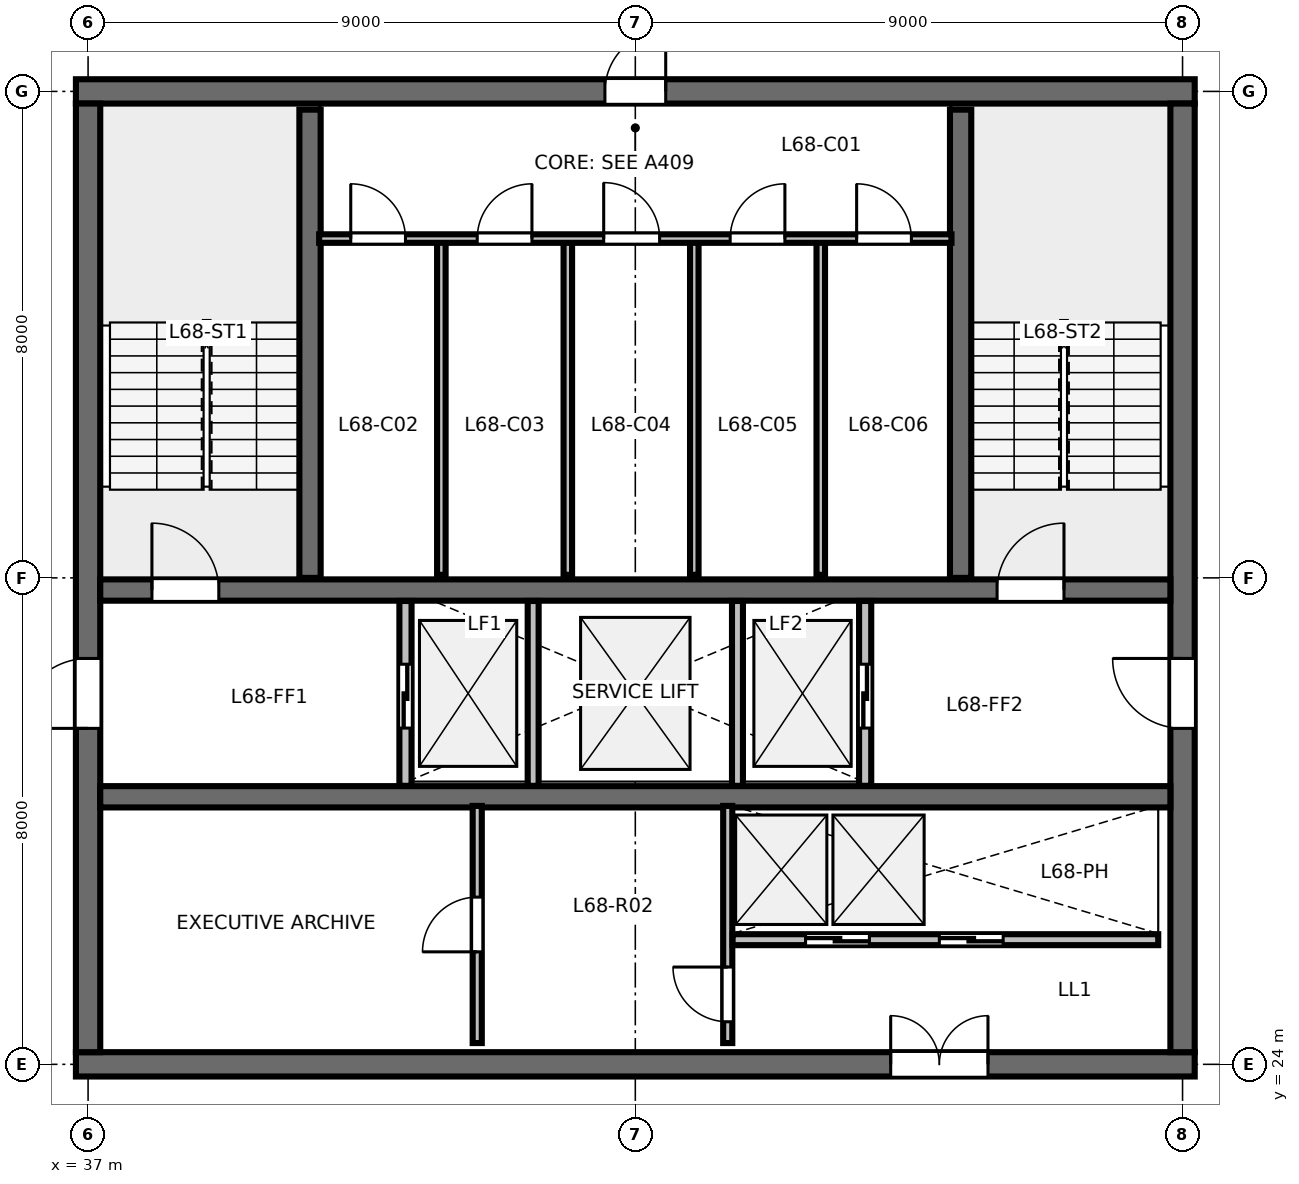
"""IFC4 building model, lengths in metres.
Left out: names, types, materials, properties, quantities, classifications, styles, units other than length and angle.
Written with IfcOpenShell. Run it as: python <this file> out.ifc"""

import sys

from ifc_helpers import new_model, si_unit, direction, frame, frame_2d, origin, place, context, subcontext, project, spatial, rectangle, extrude, element, fill, save


model = new_model("IFC4")
c1 = context("Model", 3, precision=1e-05, world=origin(), true_north=direction((0.0, 1.0)))
c2 = subcontext(c1, "Body", "Model", "MODEL_VIEW")
j1 = project(units=[si_unit("LENGTHUNIT", "METRE"), si_unit("PLANEANGLEUNIT", "RADIAN")], contexts=[c1])
p1 = place(None, origin())
s1 = spatial("IfcSite", under=j1, at=p1, CompositionType="ELEMENT")
p2 = place(p1, origin())
s2 = spatial("IfcBuilding", under=s1, at=p2, CompositionType="ELEMENT")
p3 = place(p2, frame((0.0, 0.0, 257.4)))
s3 = spatial("IfcBuildingStorey", under=s2, at=p3, CompositionType="ELEMENT", Elevation=257.4)
p4 = place(p3, frame((36.8, 24.0, 0.0), z_axis=(0.0, 0.0, 1.0), x_axis=(1.0, 0.0, 0.0)))
e1 = element("IfcWall", 1, at=p4, inside=s3, PredefinedType="SHEAR", context=c2, shape_type="SweptSolid", body=[
    extrude(rectangle(XDim=18.4, YDim=0.4, at=frame_2d((9.2, 0.0))), origin(), (0.0, 0.0, 1.0), 3.36),
])
p5 = place(p4, frame((13.4, 0.0, 0.0)))
e2 = element("IfcOpeningElement", 2, at=p5, cuts=e1, PredefinedType="OPENING", context=c2, shape_type="SweptSolid", body=[
    extrude(rectangle(XDim=1.6, YDim=2.15, at=frame_2d((0.8, 1.075))), frame((0.0, 0.21, 0.0), z_axis=(0.0, -1.0, 0.0), x_axis=(1.0, 0.0, 0.0)), (0.0, 0.0, 1.0), 0.42),
])
p6 = place(p3, frame((36.8, 40.0, 0.0), z_axis=(0.0, 0.0, 1.0), x_axis=(1.0, 0.0, 0.0)))
e3 = element("IfcWall", 3, at=p6, inside=s3, PredefinedType="SHEAR", context=c2, shape_type="SweptSolid", body=[
    extrude(rectangle(XDim=18.4, YDim=0.4, at=frame_2d((9.2, 0.0))), origin(), (0.0, 0.0, 1.0), 3.36),
])
p7 = place(p6, frame((8.7, 0.0, 0.0)))
e4 = element("IfcOpeningElement", 4, at=p7, cuts=e3, PredefinedType="OPENING", context=c2, shape_type="SweptSolid", body=[
    extrude(rectangle(XDim=1.0, YDim=2.15, at=frame_2d((0.5, 1.075))), frame((0.0, 0.21, 0.0), z_axis=(0.0, -1.0, 0.0), x_axis=(1.0, 0.0, 0.0)), (0.0, 0.0, 1.0), 0.42),
])
p8 = place(p3, frame((37.0, 24.2, 0.0), z_axis=(0.0, 0.0, 1.0), x_axis=(0.0, 1.0, 0.0)))
e5 = element("IfcWall", 5, at=p8, inside=s3, PredefinedType="SHEAR", context=c2, shape_type="SweptSolid", body=[
    extrude(rectangle(XDim=15.6, YDim=0.4, at=frame_2d((7.8, 0.0))), origin(), (0.0, 0.0, 1.0), 3.36),
])
p9 = place(p8, frame((5.325, 0.0, 0.0)))
e6 = element("IfcOpeningElement", 6, at=p9, cuts=e5, PredefinedType="OPENING", context=c2, shape_type="SweptSolid", body=[
    extrude(rectangle(XDim=1.15, YDim=2.15, at=frame_2d((0.575, 1.075))), frame((0.0, 0.21, 0.0), z_axis=(0.0, -1.0, 0.0), x_axis=(1.0, 0.0, 0.0)), (0.0, 0.0, 1.0), 0.42),
])
p10 = place(p3, frame((55.0, 24.2, 0.0), z_axis=(0.0, 0.0, 1.0), x_axis=(0.0, 1.0, 0.0)))
e7 = element("IfcWall", 7, at=p10, inside=s3, PredefinedType="SHEAR", context=c2, shape_type="SweptSolid", body=[
    extrude(rectangle(XDim=15.6, YDim=0.4, at=frame_2d((7.8, 0.0))), origin(), (0.0, 0.0, 1.0), 3.36),
])
p11 = place(p10, frame((5.325, 0.0, 0.0)))
e8 = element("IfcOpeningElement", 8, at=p11, cuts=e7, PredefinedType="OPENING", context=c2, shape_type="SweptSolid", body=[
    extrude(rectangle(XDim=1.15, YDim=2.15, at=frame_2d((0.575, 1.075))), frame((0.0, 0.21, 0.0), z_axis=(0.0, -1.0, 0.0), x_axis=(1.0, 0.0, 0.0)), (0.0, 0.0, 1.0), 0.42),
])
p12 = place(p3, frame((37.2, 31.8, 0.0), z_axis=(0.0, 0.0, 1.0), x_axis=(1.0, 0.0, 0.0)))
e9 = element("IfcWall", 9, at=p12, inside=s3, PredefinedType="SHEAR", context=c2, shape_type="SweptSolid", body=[
    extrude(rectangle(XDim=17.6, YDim=0.35, at=frame_2d((8.8, 0.0))), origin(), (0.0, 0.0, 1.0), 3.36),
])
p13 = place(p12, frame((0.85, 0.0, 0.0)))
e10 = element("IfcOpeningElement", 10, at=p13, cuts=e9, PredefinedType="OPENING", context=c2, shape_type="SweptSolid", body=[
    extrude(rectangle(XDim=1.1, YDim=2.15, at=frame_2d((0.55, 1.075))), frame((0.0, 0.185, 0.0), z_axis=(0.0, -1.0, 0.0), x_axis=(1.0, 0.0, 0.0)), (0.0, 0.0, 1.0), 0.37),
])
p14 = place(p12, frame((14.75, 0.0, 0.0)))
e11 = element("IfcOpeningElement", 11, at=p14, cuts=e9, PredefinedType="OPENING", context=c2, shape_type="SweptSolid", body=[
    extrude(rectangle(XDim=1.1, YDim=2.15, at=frame_2d((0.55, 1.075))), frame((0.0, 0.185, 0.0), z_axis=(0.0, -1.0, 0.0), x_axis=(1.0, 0.0, 0.0)), (0.0, 0.0, 1.0), 0.37),
])
p15 = place(p3, frame((37.2, 28.4, 0.0), z_axis=(0.0, 0.0, 1.0), x_axis=(1.0, 0.0, 0.0)))
e12 = element("IfcWall", 12, at=p15, inside=s3, PredefinedType="SHEAR", context=c2, shape_type="SweptSolid", body=[
    extrude(rectangle(XDim=17.6, YDim=0.35, at=frame_2d((8.8, 0.0))), origin(), (0.0, 0.0, 1.0), 3.36),
])
for number, where, z_axis, x_axis in (
    (13, (40.65, 32.0, 0.0), (0.0, 0.0, 1.0), (0.0, 1.0, 0.0)),
    (14, (51.35, 32.0, 0.0), (0.0, 0.0, 1.0), (0.0, 1.0, 0.0)),
):
    element("IfcWall", number, at=place(p3, frame(where, z_axis=z_axis, x_axis=x_axis)), inside=s3, PredefinedType="SHEAR", context=c2, shape_type="SweptSolid", body=[
        extrude(rectangle(XDim=7.7, YDim=0.35, at=frame_2d((3.85, 0.0))), origin(), (0.0, 0.0, 1.0), 3.6),
    ])
for number, where, z_axis, x_axis in (
    (15, (42.81, 32.05, 0.0), (0.0, 0.0, 1.0), (0.0, 1.0, 0.0)),
    (16, (44.89, 32.05, 0.0), (0.0, 0.0, 1.0), (0.0, 1.0, 0.0)),
    (17, (46.97, 32.05, 0.0), (0.0, 0.0, 1.0), (0.0, 1.0, 0.0)),
    (18, (49.05, 32.05, 0.0), (0.0, 0.0, 1.0), (0.0, 1.0, 0.0)),
):
    element("IfcWall", number, at=place(p3, frame(where, z_axis=z_axis, x_axis=x_axis)), inside=s3, PredefinedType="PARTITIONING", context=c2, shape_type="SweptSolid", body=[
        extrude(rectangle(XDim=5.5, YDim=0.14, at=frame_2d((2.75, 0.0))), origin(), (0.0, 0.0, 1.0), 3.375),
    ])
p16 = place(p3, frame((40.8, 37.58, 0.0), z_axis=(0.0, 0.0, 1.0), x_axis=(1.0, 0.0, 0.0)))
e19 = element("IfcWall", 19, at=p16, inside=s3, PredefinedType="PARTITIONING", context=c2, shape_type="SweptSolid", body=[
    extrude(rectangle(XDim=10.4, YDim=0.14, at=frame_2d((5.2, 0.0))), origin(), (0.0, 0.0, 1.0), 3.375),
])
p17 = place(p16, frame((0.52, 0.0, 0.0)))
e20 = element("IfcOpeningElement", 20, at=p17, cuts=e19, PredefinedType="OPENING", context=c2, shape_type="SweptSolid", body=[
    extrude(rectangle(XDim=0.9, YDim=2.15, at=frame_2d((0.45, 1.075))), frame((0.0, 0.08, 0.0), z_axis=(0.0, -1.0, 0.0), x_axis=(1.0, 0.0, 0.0)), (0.0, 0.0, 1.0), 0.16),
])
p18 = place(p16, frame((2.6, 0.0, 0.0)))
e21 = element("IfcOpeningElement", 21, at=p18, cuts=e19, PredefinedType="OPENING", context=c2, shape_type="SweptSolid", body=[
    extrude(rectangle(XDim=0.9, YDim=2.15, at=frame_2d((0.45, 1.075))), frame((0.0, 0.08, 0.0), z_axis=(0.0, -1.0, 0.0), x_axis=(1.0, 0.0, 0.0)), (0.0, 0.0, 1.0), 0.16),
])
p19 = place(p16, frame((4.68, 0.0, 0.0)))
e22 = element("IfcOpeningElement", 22, at=p19, cuts=e19, PredefinedType="OPENING", context=c2, shape_type="SweptSolid", body=[
    extrude(rectangle(XDim=0.92, YDim=2.15, at=frame_2d((0.46, 1.075))), frame((0.0, 0.08, 0.0), z_axis=(0.0, -1.0, 0.0), x_axis=(1.0, 0.0, 0.0)), (0.0, 0.0, 1.0), 0.16),
])
p20 = place(p16, frame((6.76, 0.0, 0.0)))
e23 = element("IfcOpeningElement", 23, at=p20, cuts=e19, PredefinedType="OPENING", context=c2, shape_type="SweptSolid", body=[
    extrude(rectangle(XDim=0.9, YDim=2.15, at=frame_2d((0.45, 1.075))), frame((0.0, 0.08, 0.0), z_axis=(0.0, -1.0, 0.0), x_axis=(1.0, 0.0, 0.0)), (0.0, 0.0, 1.0), 0.16),
])
p21 = place(p16, frame((8.84, 0.0, 0.0)))
e24 = element("IfcOpeningElement", 24, at=p21, cuts=e19, PredefinedType="OPENING", context=c2, shape_type="SweptSolid", body=[
    extrude(rectangle(XDim=0.9, YDim=2.15, at=frame_2d((0.45, 1.075))), frame((0.0, 0.08, 0.0), z_axis=(0.0, -1.0, 0.0), x_axis=(1.0, 0.0, 0.0)), (0.0, 0.0, 1.0), 0.16),
])
p22 = place(p3, frame((42.22, 28.58, 0.0), z_axis=(0.0, 0.0, 1.0), x_axis=(0.0, 1.0, 0.0)))
e25 = element("IfcWall", 25, at=p22, inside=s3, PredefinedType="PARTITIONING", context=c2, shape_type="SweptSolid", body=[
    extrude(rectangle(XDim=3.04, YDim=0.2, at=frame_2d((1.52, 0.0))), origin(), (0.0, 0.0, 1.0), 3.375),
])
p23 = place(p22, frame((0.95, 0.0, 0.0)))
e26 = element("IfcOpeningElement", 26, at=p23, cuts=e25, PredefinedType="OPENING", context=c2, shape_type="SweptSolid", body=[
    extrude(rectangle(XDim=1.05, YDim=2.15, at=frame_2d((0.525, 1.075))), frame((0.0, 0.11, 0.0), z_axis=(0.0, -1.0, 0.0), x_axis=(1.0, 0.0, 0.0)), (0.0, 0.0, 1.0), 0.22),
])
p24 = place(p3, frame((49.78, 28.58, 0.0), z_axis=(0.0, 0.0, 1.0), x_axis=(0.0, 1.0, 0.0)))
e27 = element("IfcWall", 27, at=p24, inside=s3, PredefinedType="PARTITIONING", context=c2, shape_type="SweptSolid", body=[
    extrude(rectangle(XDim=3.04, YDim=0.2, at=frame_2d((1.52, 0.0))), origin(), (0.0, 0.0, 1.0), 3.375),
])
p25 = place(p24, frame((0.95, 0.0, 0.0)))
e28 = element("IfcOpeningElement", 28, at=p25, cuts=e27, PredefinedType="OPENING", context=c2, shape_type="SweptSolid", body=[
    extrude(rectangle(XDim=1.05, YDim=2.15, at=frame_2d((0.525, 1.075))), frame((0.0, 0.11, 0.0), z_axis=(0.0, -1.0, 0.0), x_axis=(1.0, 0.0, 0.0)), (0.0, 0.0, 1.0), 0.22),
])
for number, where, z_axis, x_axis in (
    (29, (44.32, 28.58, 0.0), (0.0, 0.0, 1.0), (0.0, 1.0, 0.0)),
    (30, (47.68, 28.58, 0.0), (0.0, 0.0, 1.0), (0.0, 1.0, 0.0)),
):
    element("IfcWall", number, at=place(p3, frame(where, z_axis=z_axis, x_axis=x_axis)), inside=s3, PredefinedType="PARTITIONING", context=c2, shape_type="SweptSolid", body=[
        extrude(rectangle(XDim=3.04, YDim=0.18, at=frame_2d((1.52, 0.0))), origin(), (0.0, 0.0, 1.0), 3.375),
    ])
p26 = place(p3, frame((43.4, 24.35, 0.0), z_axis=(0.0, 0.0, 1.0), x_axis=(0.0, 1.0, 0.0)))
e31 = element("IfcWall", 31, at=p26, inside=s3, PredefinedType="PARTITIONING", context=c2, shape_type="SweptSolid", body=[
    extrude(rectangle(XDim=3.9, YDim=0.15, at=frame_2d((1.95, 0.0))), origin(), (0.0, 0.0, 1.0), 3.375),
])
p27 = place(p26, frame((1.5, 0.0, 0.0)))
e32 = element("IfcOpeningElement", 32, at=p27, cuts=e31, PredefinedType="OPENING", context=c2, shape_type="SweptSolid", body=[
    extrude(rectangle(XDim=0.9, YDim=2.15, at=frame_2d((0.45, 1.075))), frame((0.0, 0.085, 0.0), z_axis=(0.0, -1.0, 0.0), x_axis=(1.0, 0.0, 0.0)), (0.0, 0.0, 1.0), 0.17),
])
p28 = place(p3, frame((47.52, 24.35, 0.0), z_axis=(0.0, 0.0, 1.0), x_axis=(0.0, 1.0, 0.0)))
e33 = element("IfcWall", 33, at=p28, inside=s3, PredefinedType="PARTITIONING", context=c2, shape_type="SweptSolid", body=[
    extrude(rectangle(XDim=3.9, YDim=0.15, at=frame_2d((1.95, 0.0))), origin(), (0.0, 0.0, 1.0), 3.375),
])
p29 = place(p28, frame((0.35, 0.0, 0.0)))
e34 = element("IfcOpeningElement", 34, at=p29, cuts=e33, PredefinedType="OPENING", context=c2, shape_type="SweptSolid", body=[
    extrude(rectangle(XDim=0.9, YDim=2.15, at=frame_2d((0.45, 1.075))), frame((0.0, 0.085, 0.0), z_axis=(0.0, -1.0, 0.0), x_axis=(1.0, 0.0, 0.0)), (0.0, 0.0, 1.0), 0.17),
])
p30 = place(p3, frame((47.6, 26.05, 0.0), z_axis=(0.0, 0.0, 1.0), x_axis=(1.0, 0.0, 0.0)))
e35 = element("IfcWall", 35, at=p30, inside=s3, PredefinedType="PARTITIONING", context=c2, shape_type="SweptSolid", body=[
    extrude(rectangle(XDim=7.0, YDim=0.18, at=frame_2d((3.5, 0.0))), origin(), (0.0, 0.0, 1.0), 3.375),
])
p31 = place(p30, frame((1.2, 0.0, 0.0)))
e36 = element("IfcOpeningElement", 36, at=p31, cuts=e35, PredefinedType="OPENING", context=c2, shape_type="SweptSolid", body=[
    extrude(rectangle(XDim=1.05, YDim=2.15, at=frame_2d((0.525, 1.075))), frame((0.0, 0.1, 0.0), z_axis=(0.0, -1.0, 0.0), x_axis=(1.0, 0.0, 0.0)), (0.0, 0.0, 1.0), 0.2),
])
p32 = place(p30, frame((3.4, 0.0, 0.0)))
e37 = element("IfcOpeningElement", 37, at=p32, cuts=e35, PredefinedType="OPENING", context=c2, shape_type="SweptSolid", body=[
    extrude(rectangle(XDim=1.05, YDim=2.15, at=frame_2d((0.525, 1.075))), frame((0.0, 0.1, 0.0), z_axis=(0.0, -1.0, 0.0), x_axis=(1.0, 0.0, 0.0)), (0.0, 0.0, 1.0), 0.2),
])
p33 = place(p13, origin())
e38 = element("IfcDoor", 38, at=p33, inside=s3, OperationType="SINGLE_SWING_LEFT", PredefinedType="DOOR", context=c2, shape_type="SweptSolid", body=[
    extrude(rectangle(XDim=1.1, YDim=2.15, at=frame_2d((0.55, 1.075))), frame((0.0, 0.025, 0.0), z_axis=(0.0, -1.0, 0.0), x_axis=(1.0, 0.0, 0.0)), (0.0, 0.0, 1.0), 0.05),
])
fill(e10, e38)
p34 = place(p14, origin())
e39 = element("IfcDoor", 39, at=p34, inside=s3, OperationType="SINGLE_SWING_RIGHT", PredefinedType="DOOR", context=c2, shape_type="SweptSolid", body=[
    extrude(rectangle(XDim=1.1, YDim=2.15, at=frame_2d((0.55, 1.075))), frame((0.0, 0.025, 0.0), z_axis=(0.0, -1.0, 0.0), x_axis=(1.0, 0.0, 0.0)), (0.0, 0.0, 1.0), 0.05),
])
fill(e11, e39)
p35 = place(p7, origin())
e40 = element("IfcDoor", 40, at=p35, inside=s3, OperationType="SINGLE_SWING_RIGHT", PredefinedType="DOOR", context=c2, shape_type="SweptSolid", body=[
    extrude(rectangle(XDim=1.0, YDim=2.15, at=frame_2d((0.5, 1.075))), frame((0.0, 0.025, 0.0), z_axis=(0.0, -1.0, 0.0), x_axis=(1.0, 0.0, 0.0)), (0.0, 0.0, 1.0), 0.05),
])
fill(e4, e40)
p36 = place(p9, origin())
e41 = element("IfcDoor", 41, at=p36, inside=s3, OperationType="SINGLE_SWING_LEFT", PredefinedType="DOOR", context=c2, shape_type="SweptSolid", body=[
    extrude(rectangle(XDim=1.15, YDim=2.15, at=frame_2d((0.575, 1.075))), frame((0.0, 0.025, 0.0), z_axis=(0.0, -1.0, 0.0), x_axis=(1.0, 0.0, 0.0)), (0.0, 0.0, 1.0), 0.05),
])
fill(e6, e41)
p37 = place(p11, origin())
e42 = element("IfcDoor", 42, at=p37, inside=s3, OperationType="SINGLE_SWING_RIGHT", PredefinedType="DOOR", context=c2, shape_type="SweptSolid", body=[
    extrude(rectangle(XDim=1.15, YDim=2.15, at=frame_2d((0.575, 1.075))), frame((0.0, 0.025, 0.0), z_axis=(0.0, -1.0, 0.0), x_axis=(1.0, 0.0, 0.0)), (0.0, 0.0, 1.0), 0.05),
])
fill(e8, e42)
p38 = place(p5, origin())
e43 = element("IfcDoor", 43, at=p38, inside=s3, OperationType="DOUBLE_DOOR_SINGLE_SWING", PredefinedType="DOOR", context=c2, shape_type="SweptSolid", body=[
    extrude(rectangle(XDim=1.6, YDim=2.15, at=frame_2d((0.8, 1.075))), frame((0.0, 0.025, 0.0), z_axis=(0.0, -1.0, 0.0), x_axis=(1.0, 0.0, 0.0)), (0.0, 0.0, 1.0), 0.05),
])
fill(e2, e43)
p39 = place(p17, origin())
e44 = element("IfcDoor", 44, at=p39, inside=s3, OperationType="SINGLE_SWING_LEFT", PredefinedType="DOOR", context=c2, shape_type="SweptSolid", body=[
    extrude(rectangle(XDim=0.9, YDim=2.15, at=frame_2d((0.45, 1.075))), frame((0.0, 0.025, 0.0), z_axis=(0.0, -1.0, 0.0), x_axis=(1.0, 0.0, 0.0)), (0.0, 0.0, 1.0), 0.05),
])
fill(e20, e44)
p40 = place(p18, origin())
e45 = element("IfcDoor", 45, at=p40, inside=s3, OperationType="SINGLE_SWING_RIGHT", PredefinedType="DOOR", context=c2, shape_type="SweptSolid", body=[
    extrude(rectangle(XDim=0.9, YDim=2.15, at=frame_2d((0.45, 1.075))), frame((0.0, 0.025, 0.0), z_axis=(0.0, -1.0, 0.0), x_axis=(1.0, 0.0, 0.0)), (0.0, 0.0, 1.0), 0.05),
])
fill(e21, e45)
p41 = place(p19, origin())
e46 = element("IfcDoor", 46, at=p41, inside=s3, OperationType="SINGLE_SWING_LEFT", PredefinedType="DOOR", context=c2, shape_type="SweptSolid", body=[
    extrude(rectangle(XDim=0.92, YDim=2.15, at=frame_2d((0.46, 1.075))), frame((0.0, 0.025, 0.0), z_axis=(0.0, -1.0, 0.0), x_axis=(1.0, 0.0, 0.0)), (0.0, 0.0, 1.0), 0.05),
])
fill(e22, e46)
p42 = place(p20, origin())
e47 = element("IfcDoor", 47, at=p42, inside=s3, OperationType="SINGLE_SWING_RIGHT", PredefinedType="DOOR", context=c2, shape_type="SweptSolid", body=[
    extrude(rectangle(XDim=0.9, YDim=2.15, at=frame_2d((0.45, 1.075))), frame((0.0, 0.025, 0.0), z_axis=(0.0, -1.0, 0.0), x_axis=(1.0, 0.0, 0.0)), (0.0, 0.0, 1.0), 0.05),
])
fill(e23, e47)
p43 = place(p21, origin())
e48 = element("IfcDoor", 48, at=p43, inside=s3, OperationType="SINGLE_SWING_LEFT", PredefinedType="DOOR", context=c2, shape_type="SweptSolid", body=[
    extrude(rectangle(XDim=0.9, YDim=2.15, at=frame_2d((0.45, 1.075))), frame((0.0, 0.025, 0.0), z_axis=(0.0, -1.0, 0.0), x_axis=(1.0, 0.0, 0.0)), (0.0, 0.0, 1.0), 0.05),
])
fill(e24, e48)
p44 = place(p23, origin())
e49 = element("IfcDoor", 49, at=p44, inside=s3, OperationType="SLIDING_TO_LEFT", PredefinedType="DOOR", context=c2, shape_type="SweptSolid", body=[
    extrude(rectangle(XDim=1.05, YDim=2.15, at=frame_2d((0.525, 1.075))), frame((0.0, 0.025, 0.0), z_axis=(0.0, -1.0, 0.0), x_axis=(1.0, 0.0, 0.0)), (0.0, 0.0, 1.0), 0.05),
])
fill(e26, e49)
p45 = place(p25, origin())
e50 = element("IfcDoor", 50, at=p45, inside=s3, OperationType="SLIDING_TO_RIGHT", PredefinedType="DOOR", context=c2, shape_type="SweptSolid", body=[
    extrude(rectangle(XDim=1.05, YDim=2.15, at=frame_2d((0.525, 1.075))), frame((0.0, 0.025, 0.0), z_axis=(0.0, -1.0, 0.0), x_axis=(1.0, 0.0, 0.0)), (0.0, 0.0, 1.0), 0.05),
])
fill(e28, e50)
p46 = place(p27, origin())
e51 = element("IfcDoor", 51, at=p46, inside=s3, OperationType="SINGLE_SWING_LEFT", PredefinedType="DOOR", context=c2, shape_type="SweptSolid", body=[
    extrude(rectangle(XDim=0.9, YDim=2.15, at=frame_2d((0.45, 1.075))), frame((0.0, 0.025, 0.0), z_axis=(0.0, -1.0, 0.0), x_axis=(1.0, 0.0, 0.0)), (0.0, 0.0, 1.0), 0.05),
])
fill(e32, e51)
p47 = place(p29, origin())
e52 = element("IfcDoor", 52, at=p47, inside=s3, OperationType="SINGLE_SWING_RIGHT", PredefinedType="DOOR", context=c2, shape_type="SweptSolid", body=[
    extrude(rectangle(XDim=0.9, YDim=2.15, at=frame_2d((0.45, 1.075))), frame((0.0, 0.025, 0.0), z_axis=(0.0, -1.0, 0.0), x_axis=(1.0, 0.0, 0.0)), (0.0, 0.0, 1.0), 0.05),
])
fill(e34, e52)
p48 = place(p31, origin())
e53 = element("IfcDoor", 53, at=p48, inside=s3, OperationType="SLIDING_TO_LEFT", PredefinedType="DOOR", context=c2, shape_type="SweptSolid", body=[
    extrude(rectangle(XDim=1.05, YDim=2.15, at=frame_2d((0.525, 1.075))), frame((0.0, 0.025, 0.0), z_axis=(0.0, -1.0, 0.0), x_axis=(1.0, 0.0, 0.0)), (0.0, 0.0, 1.0), 0.05),
])
fill(e36, e53)
p49 = place(p32, origin())
e54 = element("IfcDoor", 54, at=p49, inside=s3, OperationType="SLIDING_TO_RIGHT", PredefinedType="DOOR", context=c2, shape_type="SweptSolid", body=[
    extrude(rectangle(XDim=1.05, YDim=2.15, at=frame_2d((0.525, 1.075))), frame((0.0, 0.025, 0.0), z_axis=(0.0, -1.0, 0.0), x_axis=(1.0, 0.0, 0.0)), (0.0, 0.0, 1.0), 0.05),
])
fill(e37, e54)
save(model, sys.argv[1])
